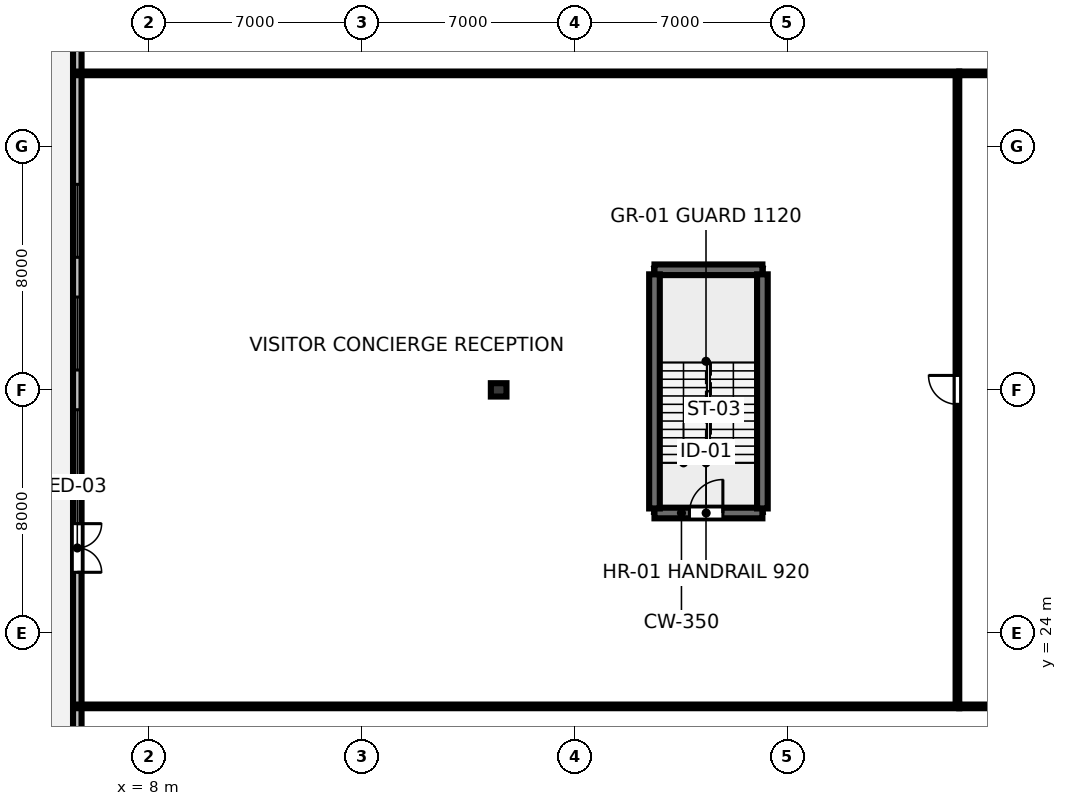
"""IFC4 building model, lengths in metres.
Left out: names, types, materials, properties, quantities, classifications, styles, units other than length and angle.
Written with IfcOpenShell. Run it as: python <this file> out.ifc"""

import sys

from ifc_helpers import new_model, si_unit, direction, frame, frame_2d, origin, origin_2d, place, context, subcontext, project, spatial, rectangle, i_section, extrude, element, fill, save


model = new_model("IFC4")
c1 = context("Model", 3, precision=1e-05, world=origin(), true_north=direction((0.0, 1.0)))
c2 = subcontext(c1, "Body", "Model", "MODEL_VIEW")
j1 = project(units=[si_unit("LENGTHUNIT", "METRE"), si_unit("PLANEANGLEUNIT", "RADIAN")], contexts=[c1])
p1 = place(None, origin())
s1 = spatial("IfcSite", under=j1, at=p1, CompositionType="ELEMENT")
p2 = place(p1, origin())
s2 = spatial("IfcBuilding", under=s1, at=p2, CompositionType="ELEMENT")
p3 = place(p2, frame((0.0, 0.0, 5.0)))
s3 = spatial("IfcBuildingStorey", under=s2, at=p3, CompositionType="ELEMENT", Elevation=5.0)
p4 = place(p3, frame((19.5, 32.0, 0.0), z_axis=(0.0, 0.0, 1.0), x_axis=(0.0, 1.0, 0.0)))
e1 = element("IfcColumn", 1, at=p4, inside=s3, PredefinedType="COLUMN", context=c2, shape_type="SweptSolid", body=[
    extrude(i_section(OverallWidth=0.439, OverallDepth=0.514, WebThickness=0.06, FlangeThickness=0.097, FilletRadius=0.025, at=origin_2d()), origin(), (0.0, 0.0, 1.0), 4.218),
])
p5 = place(p3, frame((5.64, 55.34, 0.0), z_axis=(0.0, 0.0, 1.0), x_axis=(0.0, -1.0, 0.0)))
e2 = element("IfcWall", 2, at=p5, inside=s3, PredefinedType="STANDARD", context=c2, shape_type="SweptSolid", body=[
    extrude(rectangle(XDim=46.68, YDim=0.28, at=frame_2d((23.34, 0.0))), origin(), (0.0, 0.0, 1.0), 4.22),
])
p6 = place(p5, frame((27.74, 0.0, 0.0)))
e3 = element("IfcOpeningElement", 3, at=p6, cuts=e2, PredefinedType="OPENING", context=c2, shape_type="SweptSolid", body=[
    extrude(rectangle(XDim=1.6, YDim=2.15, at=frame_2d((0.8, 1.075))), frame((0.0, 0.15, 0.0), z_axis=(0.0, -1.0, 0.0), x_axis=(1.0, 0.0, 0.0)), (0.0, 0.0, 1.0), 0.3),
])
p7 = place(p5, frame((1.753, 0.0, 0.85)))
e4 = element("IfcOpeningElement", 4, at=p7, cuts=e2, PredefinedType="OPENING", context=c2, shape_type="SweptSolid", body=[
    extrude(rectangle(XDim=2.4, YDim=2.4, at=frame_2d((1.2, 1.2))), frame((0.0, 0.15, 0.0), z_axis=(0.0, -1.0, 0.0), x_axis=(1.0, 0.0, 0.0)), (0.0, 0.0, 1.0), 0.3),
])
p8 = place(p5, frame((5.46, 0.0, 0.85)))
e5 = element("IfcOpeningElement", 5, at=p8, cuts=e2, PredefinedType="OPENING", context=c2, shape_type="SweptSolid", body=[
    extrude(rectangle(XDim=2.4, YDim=2.4, at=frame_2d((1.2, 1.2))), frame((0.0, 0.15, 0.0), z_axis=(0.0, -1.0, 0.0), x_axis=(1.0, 0.0, 0.0)), (0.0, 0.0, 1.0), 0.3),
])
p9 = place(p5, frame((9.167, 0.0, 0.85)))
e6 = element("IfcOpeningElement", 6, at=p9, cuts=e2, PredefinedType="OPENING", context=c2, shape_type="SweptSolid", body=[
    extrude(rectangle(XDim=2.4, YDim=2.4, at=frame_2d((1.2, 1.2))), frame((0.0, 0.15, 0.0), z_axis=(0.0, -1.0, 0.0), x_axis=(1.0, 0.0, 0.0)), (0.0, 0.0, 1.0), 0.3),
])
p10 = place(p5, frame((16.58, 0.0, 0.85)))
e7 = element("IfcOpeningElement", 7, at=p10, cuts=e2, PredefinedType="OPENING", context=c2, shape_type="SweptSolid", body=[
    extrude(rectangle(XDim=2.4, YDim=2.4, at=frame_2d((1.2, 1.2))), frame((0.0, 0.15, 0.0), z_axis=(0.0, -1.0, 0.0), x_axis=(1.0, 0.0, 0.0)), (0.0, 0.0, 1.0), 0.3),
])
p11 = place(p5, frame((20.287, 0.0, 0.85)))
e8 = element("IfcOpeningElement", 8, at=p11, cuts=e2, PredefinedType="OPENING", context=c2, shape_type="SweptSolid", body=[
    extrude(rectangle(XDim=2.4, YDim=2.4, at=frame_2d((1.2, 1.2))), frame((0.0, 0.15, 0.0), z_axis=(0.0, -1.0, 0.0), x_axis=(1.0, 0.0, 0.0)), (0.0, 0.0, 1.0), 0.3),
])
p12 = place(p5, frame((23.993, 0.0, 0.85)))
e9 = element("IfcOpeningElement", 9, at=p12, cuts=e2, PredefinedType="OPENING", context=c2, shape_type="SweptSolid", body=[
    extrude(rectangle(XDim=2.4, YDim=2.4, at=frame_2d((1.2, 1.2))), frame((0.0, 0.15, 0.0), z_axis=(0.0, -1.0, 0.0), x_axis=(1.0, 0.0, 0.0)), (0.0, 0.0, 1.0), 0.3),
])
p13 = place(p5, frame((35.113, 0.0, 0.85)))
e10 = element("IfcOpeningElement", 10, at=p13, cuts=e2, PredefinedType="OPENING", context=c2, shape_type="SweptSolid", body=[
    extrude(rectangle(XDim=2.4, YDim=2.4, at=frame_2d((1.2, 1.2))), frame((0.0, 0.15, 0.0), z_axis=(0.0, -1.0, 0.0), x_axis=(1.0, 0.0, 0.0)), (0.0, 0.0, 1.0), 0.3),
])
p14 = place(p5, frame((38.82, 0.0, 0.85)))
e11 = element("IfcOpeningElement", 11, at=p14, cuts=e2, PredefinedType="OPENING", context=c2, shape_type="SweptSolid", body=[
    extrude(rectangle(XDim=2.4, YDim=2.4, at=frame_2d((1.2, 1.2))), frame((0.0, 0.15, 0.0), z_axis=(0.0, -1.0, 0.0), x_axis=(1.0, 0.0, 0.0)), (0.0, 0.0, 1.0), 0.3),
])
p15 = place(p5, frame((42.527, 0.0, 0.85)))
e12 = element("IfcOpeningElement", 12, at=p15, cuts=e2, PredefinedType="OPENING", context=c2, shape_type="SweptSolid", body=[
    extrude(rectangle(XDim=2.4, YDim=2.4, at=frame_2d((1.2, 1.2))), frame((0.0, 0.15, 0.0), z_axis=(0.0, -1.0, 0.0), x_axis=(1.0, 0.0, 0.0)), (0.0, 0.0, 1.0), 0.3),
])
p16 = place(p3, frame((34.65, 21.59, 0.0), z_axis=(0.0, 0.0, 1.0), x_axis=(1.0, 0.0, 0.0)))
e13 = element("IfcWall", 13, at=p16, inside=s3, PredefinedType="PARTITIONING", context=c2, shape_type="SweptSolid", body=[
    extrude(rectangle(XDim=22.7, YDim=0.12, at=frame_2d((11.35, 0.0))), origin(), (0.0, 0.0, 1.0), 3.32),
])
p17 = place(p16, frame((10.875, 0.0, 0.0)))
e14 = element("IfcOpeningElement", 14, at=p17, cuts=e13, PredefinedType="OPENING", context=c2, shape_type="SweptSolid", body=[
    extrude(rectangle(XDim=0.95, YDim=2.15, at=frame_2d((0.475, 1.075))), frame((0.0, 0.07, 0.0), z_axis=(0.0, -1.0, 0.0), x_axis=(1.0, 0.0, 0.0)), (0.0, 0.0, 1.0), 0.14),
])
p18 = place(p3, frame((34.65, 42.41, 0.0), z_axis=(0.0, 0.0, 1.0), x_axis=(1.0, 0.0, 0.0)))
e15 = element("IfcWall", 15, at=p18, inside=s3, PredefinedType="PARTITIONING", context=c2, shape_type="SweptSolid", body=[
    extrude(rectangle(XDim=22.7, YDim=0.12, at=frame_2d((11.35, 0.0))), origin(), (0.0, 0.0, 1.0), 3.32),
])
p19 = place(p18, frame((11.497, 0.0, 0.0)))
e16 = element("IfcOpeningElement", 16, at=p19, cuts=e15, PredefinedType="OPENING", context=c2, shape_type="SweptSolid", body=[
    extrude(rectangle(XDim=0.95, YDim=2.15, at=frame_2d((0.475, 1.075))), frame((0.0, 0.07, 0.0), z_axis=(0.0, -1.0, 0.0), x_axis=(1.0, 0.0, 0.0)), (0.0, 0.0, 1.0), 0.14),
])
p20 = place(p3, frame((34.59, 21.65, 0.0), z_axis=(0.0, 0.0, 1.0), x_axis=(0.0, 1.0, 0.0)))
e17 = element("IfcWall", 17, at=p20, inside=s3, PredefinedType="PARTITIONING", context=c2, shape_type="SweptSolid", body=[
    extrude(rectangle(XDim=20.7, YDim=0.12, at=frame_2d((10.35, 0.0))), origin(), (0.0, 0.0, 1.0), 3.32),
])
p21 = place(p20, frame((9.875, 0.0, 0.0)))
e18 = element("IfcOpeningElement", 18, at=p21, cuts=e17, PredefinedType="OPENING", context=c2, shape_type="SweptSolid", body=[
    extrude(rectangle(XDim=0.95, YDim=2.15, at=frame_2d((0.475, 1.075))), frame((0.0, 0.07, 0.0), z_axis=(0.0, -1.0, 0.0), x_axis=(1.0, 0.0, 0.0)), (0.0, 0.0, 1.0), 0.14),
])
for number, where, z_axis, x_axis in (
    (19, (34.65, 21.59, 0.0), (0.0, 0.0, 1.0), (-1.0, 0.0, 0.0)),
    (20, (34.65, 42.41, 0.0), (0.0, 0.0, 1.0), (-1.0, 0.0, 0.0)),
):
    element("IfcWall", number, at=place(p3, frame(where, z_axis=z_axis, x_axis=x_axis)), inside=s3, PredefinedType="PARTITIONING", context=c2, shape_type="SweptSolid", body=[
        extrude(rectangle(XDim=29.01, YDim=0.12, at=frame_2d((14.505, 0.0))), origin(), (0.0, 0.0, 1.0), 3.32),
    ])
p22 = place(p3, frame((24.625, 27.95, 0.0), z_axis=(0.0, 0.0, 1.0), x_axis=(1.0, 0.0, 0.0)))
e21 = element("IfcWall", 21, at=p22, inside=s3, PredefinedType="SHEAR", context=c2, shape_type="SweptSolid", body=[
    extrude(rectangle(XDim=3.55, YDim=0.35, at=frame_2d((1.775, 0.0))), origin(), (0.0, 0.0, 1.0), 4.5),
])
p23 = place(p22, frame((1.15, 0.0, 0.0)))
e22 = element("IfcOpeningElement", 22, at=p23, cuts=e21, PredefinedType="OPENING", context=c2, shape_type="SweptSolid", body=[
    extrude(rectangle(XDim=1.1, YDim=2.15, at=frame_2d((0.55, 1.075))), frame((0.0, 0.185, 0.0), z_axis=(0.0, -1.0, 0.0), x_axis=(1.0, 0.0, 0.0)), (0.0, 0.0, 1.0), 0.37),
])
p24 = place(p3, frame((24.625, 35.95, 0.0), z_axis=(0.0, 0.0, 1.0), x_axis=(1.0, 0.0, 0.0)))
e23 = element("IfcWall", 23, at=p24, inside=s3, PredefinedType="SHEAR", context=c2, shape_type="SweptSolid", body=[
    extrude(rectangle(XDim=3.55, YDim=0.35, at=frame_2d((1.775, 0.0))), origin(), (0.0, 0.0, 1.0), 4.5),
])
for number, where, z_axis, x_axis in (
    (24, (24.625, 28.1, 0.0), (0.0, 0.0, 1.0), (0.0, 1.0, 0.0)),
    (25, (28.175, 28.1, 0.0), (0.0, 0.0, 1.0), (0.0, 1.0, 0.0)),
):
    element("IfcWall", number, at=place(p3, frame(where, z_axis=z_axis, x_axis=x_axis)), inside=s3, PredefinedType="SHEAR", context=c2, shape_type="SweptSolid", body=[
        extrude(rectangle(XDim=7.7, YDim=0.35, at=frame_2d((3.85, 0.0))), origin(), (0.0, 0.0, 1.0), 4.5),
    ])
p25 = place(p6, origin())
e26 = element("IfcDoor", 26, at=p25, inside=s3, OperationType="DOUBLE_DOOR_SINGLE_SWING", PredefinedType="DOOR", context=c2, shape_type="SweptSolid", body=[
    extrude(rectangle(XDim=1.6, YDim=2.15, at=frame_2d((0.8, 1.075))), frame((0.0, 0.025, 0.0), z_axis=(0.0, -1.0, 0.0), x_axis=(1.0, 0.0, 0.0)), (0.0, 0.0, 1.0), 0.05),
])
fill(e3, e26)
p26 = place(p10, origin())
e27 = element("IfcWindow", 27, at=p26, inside=s3, PartitioningType="SINGLE_PANEL", PredefinedType="WINDOW", context=c2, shape_type="SweptSolid", body=[
    extrude(rectangle(XDim=2.4, YDim=2.4, at=frame_2d((1.2, 1.2))), frame((0.0, 0.03, 0.0), z_axis=(0.0, -1.0, 0.0), x_axis=(1.0, 0.0, 0.0)), (0.0, 0.0, 1.0), 0.06),
])
fill(e7, e27)
p27 = place(p11, origin())
e28 = element("IfcWindow", 28, at=p27, inside=s3, PartitioningType="SINGLE_PANEL", PredefinedType="WINDOW", context=c2, shape_type="SweptSolid", body=[
    extrude(rectangle(XDim=2.4, YDim=2.4, at=frame_2d((1.2, 1.2))), frame((0.0, 0.03, 0.0), z_axis=(0.0, -1.0, 0.0), x_axis=(1.0, 0.0, 0.0)), (0.0, 0.0, 1.0), 0.06),
])
fill(e8, e28)
p28 = place(p12, origin())
e29 = element("IfcWindow", 29, at=p28, inside=s3, PartitioningType="SINGLE_PANEL", PredefinedType="WINDOW", context=c2, shape_type="SweptSolid", body=[
    extrude(rectangle(XDim=2.4, YDim=2.4, at=frame_2d((1.2, 1.2))), frame((0.0, 0.03, 0.0), z_axis=(0.0, -1.0, 0.0), x_axis=(1.0, 0.0, 0.0)), (0.0, 0.0, 1.0), 0.06),
])
fill(e9, e29)
p29 = place(p21, origin())
e30 = element("IfcDoor", 30, at=p29, inside=s3, OperationType="SINGLE_SWING_RIGHT", PredefinedType="DOOR", context=c2, shape_type="SweptSolid", body=[
    extrude(rectangle(XDim=0.95, YDim=2.15, at=frame_2d((0.475, 1.075))), frame((0.0, 0.025, 0.0), z_axis=(0.0, -1.0, 0.0), x_axis=(1.0, 0.0, 0.0)), (0.0, 0.0, 1.0), 0.05),
])
fill(e18, e30)
p30 = place(p23, origin())
e31 = element("IfcDoor", 31, at=p30, inside=s3, OperationType="SINGLE_SWING_RIGHT", PredefinedType="DOOR", context=c2, shape_type="SweptSolid", body=[
    extrude(rectangle(XDim=1.1, YDim=2.15, at=frame_2d((0.55, 1.075))), frame((0.0, 0.025, 0.0), z_axis=(0.0, -1.0, 0.0), x_axis=(1.0, 0.0, 0.0)), (0.0, 0.0, 1.0), 0.05),
])
fill(e22, e31)
save(model, sys.argv[1])
